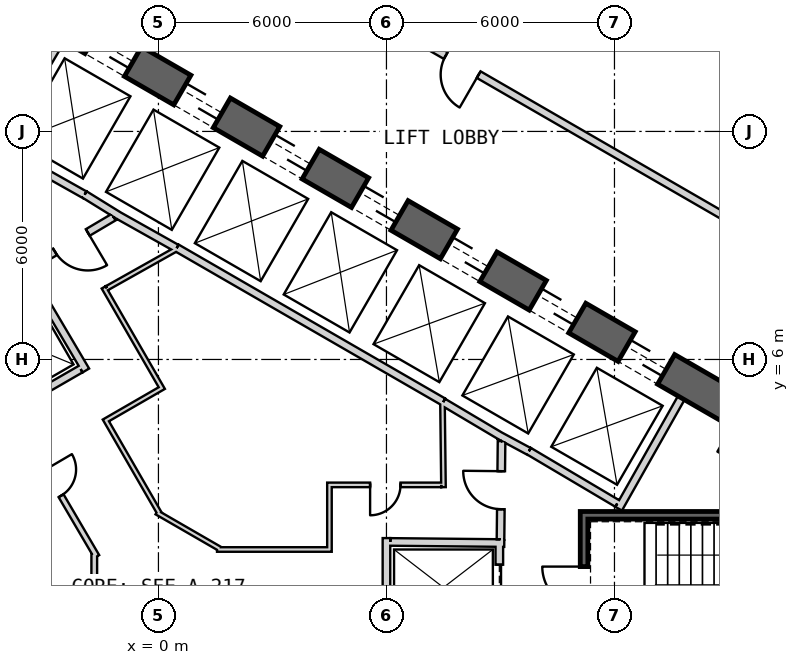
"""IFC4 building model, lengths in metres.
Left out: names, types, materials, properties, quantities, classifications, styles, units other than length and angle.
Written with IfcOpenShell. Run it as: python <this file> out.ifc"""

import sys

from ifc_helpers import new_model, si_unit, direction, frame, frame_2d, origin, place, context, subcontext, project, spatial, rectangle, extrude, element, fill, save


model = new_model("IFC4")
c1 = context("Model", 3, precision=1e-05, world=origin(), true_north=direction((0.0, 1.0)))
c2 = subcontext(c1, "Body", "Model", "MODEL_VIEW")
j1 = project(units=[si_unit("LENGTHUNIT", "METRE"), si_unit("PLANEANGLEUNIT", "RADIAN")], contexts=[c1])
p1 = place(None, origin())
s1 = spatial("IfcSite", under=j1, at=p1, CompositionType="ELEMENT")
p2 = place(p1, origin())
s2 = spatial("IfcBuilding", under=s1, at=p2, CompositionType="ELEMENT")
p3 = place(p2, frame((0.0, 0.0, 131.6)))
s3 = spatial("IfcBuildingStorey", under=s2, at=p3, CompositionType="ELEMENT", Elevation=131.6)
p4 = place(p3, frame((19.475, 2.208, 0.0), z_axis=(0.0, 0.0, 1.0), x_axis=(-0.866028369851, 0.499994862586, 0.0)))
e1 = element("IfcWall", 1, at=p4, inside=s3, PredefinedType="SHEAR", context=c2, shape_type="SweptSolid", body=[
    extrude(rectangle(XDim=31.523, YDim=0.9, at=frame_2d((15.762, 0.0))), origin(), (0.0, 0.0, 1.0), 4.1),
])
p5 = place(p4, frame((7.062, 0.0, 0.0)))
e2 = element("IfcOpeningElement", 2, at=p5, cuts=e1, PredefinedType="OPENING", context=c2, shape_type="SweptSolid", body=[
    extrude(rectangle(XDim=1.2, YDim=2.4, at=frame_2d((0.6, 1.2))), frame((0.0, 0.46, 0.0), z_axis=(0.0, -1.0, 0.0), x_axis=(1.0, 0.0, 0.0)), (0.0, 0.0, 1.0), 0.92),
])
p6 = place(p4, frame((9.762, 0.0, 0.0)))
e3 = element("IfcOpeningElement", 3, at=p6, cuts=e1, PredefinedType="OPENING", context=c2, shape_type="SweptSolid", body=[
    extrude(rectangle(XDim=1.2, YDim=2.4, at=frame_2d((0.6, 1.2))), frame((0.0, 0.46, 0.0), z_axis=(0.0, -1.0, 0.0), x_axis=(1.0, 0.0, 0.0)), (0.0, 0.0, 1.0), 0.92),
])
p7 = place(p4, frame((12.462, 0.0, 0.0)))
e4 = element("IfcOpeningElement", 4, at=p7, cuts=e1, PredefinedType="OPENING", context=c2, shape_type="SweptSolid", body=[
    extrude(rectangle(XDim=1.2, YDim=2.4, at=frame_2d((0.6, 1.2))), frame((0.0, 0.46, 0.0), z_axis=(0.0, -1.0, 0.0), x_axis=(1.0, 0.0, 0.0)), (0.0, 0.0, 1.0), 0.92),
])
p8 = place(p4, frame((15.162, 0.0, 0.0)))
e5 = element("IfcOpeningElement", 5, at=p8, cuts=e1, PredefinedType="OPENING", context=c2, shape_type="SweptSolid", body=[
    extrude(rectangle(XDim=1.2, YDim=2.4, at=frame_2d((0.6, 1.2))), frame((0.0, 0.46, 0.0), z_axis=(0.0, -1.0, 0.0), x_axis=(1.0, 0.0, 0.0)), (0.0, 0.0, 1.0), 0.92),
])
p9 = place(p4, frame((17.862, 0.0, 0.0)))
e6 = element("IfcOpeningElement", 6, at=p9, cuts=e1, PredefinedType="OPENING", context=c2, shape_type="SweptSolid", body=[
    extrude(rectangle(XDim=1.2, YDim=2.4, at=frame_2d((0.6, 1.2))), frame((0.0, 0.46, 0.0), z_axis=(0.0, -1.0, 0.0), x_axis=(1.0, 0.0, 0.0)), (0.0, 0.0, 1.0), 0.92),
])
p10 = place(p4, frame((20.562, 0.0, 0.0)))
e7 = element("IfcOpeningElement", 7, at=p10, cuts=e1, PredefinedType="OPENING", context=c2, shape_type="SweptSolid", body=[
    extrude(rectangle(XDim=1.2, YDim=2.4, at=frame_2d((0.6, 1.2))), frame((0.0, 0.46, 0.0), z_axis=(0.0, -1.0, 0.0), x_axis=(1.0, 0.0, 0.0)), (0.0, 0.0, 1.0), 0.92),
])
p11 = place(p4, frame((23.262, 0.0, 0.0)))
e8 = element("IfcOpeningElement", 8, at=p11, cuts=e1, PredefinedType="OPENING", context=c2, shape_type="SweptSolid", body=[
    extrude(rectangle(XDim=1.2, YDim=2.4, at=frame_2d((0.6, 1.2))), frame((0.0, 0.46, 0.0), z_axis=(0.0, -1.0, 0.0), x_axis=(1.0, 0.0, 0.0)), (0.0, 0.0, 1.0), 0.92),
])
p12 = place(p4, frame((3.612, 0.0, 0.0)))
e9 = element("IfcOpeningElement", 9, at=p12, cuts=e1, PredefinedType="OPENING", context=c2, shape_type="SweptSolid", body=[
    extrude(rectangle(XDim=1.2, YDim=2.4, at=frame_2d((0.6, 1.2))), frame((0.0, 0.46, 0.0), z_axis=(0.0, -1.0, 0.0), x_axis=(1.0, 0.0, 0.0)), (0.0, 0.0, 1.0), 0.92),
])
p13 = place(p4, frame((26.712, 0.0, 0.0)))
e10 = element("IfcOpeningElement", 10, at=p13, cuts=e1, PredefinedType="OPENING", context=c2, shape_type="SweptSolid", body=[
    extrude(rectangle(XDim=1.2, YDim=2.4, at=frame_2d((0.6, 1.2))), frame((0.0, 0.46, 0.0), z_axis=(0.0, -1.0, 0.0), x_axis=(1.0, 0.0, 0.0)), (0.0, 0.0, 1.0), 0.92),
])
p14 = place(p3, frame((7.497, 4.886, 0.0), z_axis=(0.0, 0.0, 1.0), x_axis=(-0.866030989016, 0.499990325971, 0.0)))
e11 = element("IfcWall", 11, at=p14, inside=s3, PredefinedType="PLUMBINGWALL", context=c2, shape_type="SweptSolid", body=[
    extrude(rectangle(XDim=8.1, YDim=0.2, at=frame_2d((4.05, 0.0))), origin(), (0.0, 0.0, 1.0), 3.8),
])
p15 = place(p3, frame((12.11, 2.073, 0.0), z_axis=(0.0, 0.0, 1.0), x_axis=(0.49196600604, 0.870614408852, 0.0)))
e12 = element("IfcWall", 12, at=p15, inside=s3, PredefinedType="PLUMBINGWALL", context=c2, shape_type="SweptSolid", body=[
    extrude(rectangle(XDim=3.35, YDim=0.2, at=frame_2d((1.675, 0.0))), origin(), (0.0, 0.0, 1.0), 3.8),
])
p16 = place(p3, frame((12.073, 2.211, 0.0), z_axis=(0.0, 0.0, 1.0), x_axis=(-0.860438357912, 0.509554542943, 0.0)))
e13 = element("IfcWall", 13, at=p16, inside=s3, PredefinedType="PLUMBINGWALL", context=c2, shape_type="SweptSolid", body=[
    extrude(rectangle(XDim=2.7, YDim=0.2, at=frame_2d((1.35, 0.0))), origin(), (0.0, 0.0, 1.0), 3.8),
])
p17 = place(p3, frame((9.748, 3.583, 0.0), z_axis=(0.0, 0.0, 1.0), x_axis=(-0.880917147855, 0.473270513147, 0.0)))
e14 = element("IfcWall", 14, at=p17, inside=s3, PredefinedType="PLUMBINGWALL", context=c2, shape_type="SweptSolid", body=[
    extrude(rectangle(XDim=0.878, YDim=0.2, at=frame_2d((0.439, 0.0))), origin(), (0.0, 0.0, 1.0), 3.8),
])
p18 = place(p3, frame((9.08, 3.937, 0.0), z_axis=(0.0, 0.0, 1.0), x_axis=(-0.859981807212, 0.510324691999, 0.0)))
e15 = element("IfcWall", 15, at=p18, inside=s3, PredefinedType="PLUMBINGWALL", context=c2, shape_type="SweptSolid", body=[
    extrude(rectangle(XDim=1.845, YDim=0.2, at=frame_2d((0.922, 0.0))), origin(), (0.0, 0.0, 1.0), 3.8),
])
p19 = place(p3, frame((-1.941, 10.339, 0.0), z_axis=(0.0, 0.0, 1.0), x_axis=(0.850216889117, -0.526432561171, 0.0)))
e16 = element("IfcWall", 16, at=p19, inside=s3, PredefinedType="PLUMBINGWALL", context=c2, shape_type="SweptSolid", body=[
    extrude(rectangle(XDim=1.078, YDim=0.2, at=frame_2d((0.539, 0.0))), origin(), (0.0, 0.0, 1.0), 3.8),
])
p20 = place(p3, frame((0.478, 8.928, 0.0), z_axis=(0.0, 0.0, 1.0), x_axis=(-0.871988740738, 0.489525929882, 0.0)))
e17 = element("IfcWall", 17, at=p20, inside=s3, PredefinedType="PLUMBINGWALL", context=c2, shape_type="SweptSolid", body=[
    extrude(rectangle(XDim=1.845, YDim=0.2, at=frame_2d((0.922, 0.0))), origin(), (0.0, 0.0, 1.0), 3.8),
])
p21 = place(p3, frame((-4.296, 11.659, 0.0), z_axis=(0.0, 0.0, 1.0), x_axis=(0.871534483978, -0.490334215854, 0.0)))
e18 = element("IfcWall", 18, at=p21, inside=s3, PredefinedType="PLUMBINGWALL", context=c2, shape_type="SweptSolid", body=[
    extrude(rectangle(XDim=2.7, YDim=0.2, at=frame_2d((1.35, 0.0))), origin(), (0.0, 0.0, 1.0), 3.8),
])
p22 = place(p3, frame((-4.158, 11.696, 0.0), z_axis=(0.0, 0.0, 1.0), x_axis=(0.508018930956, 0.861345903683, 0.0)))
e19 = element("IfcWall", 19, at=p22, inside=s3, PredefinedType="PLUMBINGWALL", context=c2, shape_type="SweptSolid", body=[
    extrude(rectangle(XDim=3.15, YDim=0.2, at=frame_2d((1.575, 0.0))), origin(), (0.0, 0.0, 1.0), 3.8),
])
p23 = place(p3, frame((19.2, 1.9, -0.3), z_axis=(0.0, 0.0, 1.0), x_axis=(-1.0, 0.0, 0.0)))
e20 = element("IfcWall", 20, at=p23, inside=s3, PredefinedType="SHEAR", context=c2, shape_type="SweptSolid", body=[
    extrude(rectangle(XDim=8.1, YDim=0.2, at=frame_2d((4.05, 0.0))), origin(), (0.0, 0.0, 1.0), 4.1),
])
p24 = place(p3, frame((11.2, -1.8, -0.3), z_axis=(0.0, 0.0, 1.0), x_axis=(0.0, 1.0, 0.0)))
e21 = element("IfcWall", 21, at=p24, inside=s3, PredefinedType="SHEAR", context=c2, shape_type="SweptSolid", body=[
    extrude(rectangle(XDim=3.6, YDim=0.2, at=frame_2d((1.8, 0.0))), origin(), (0.0, 0.0, 1.0), 4.1),
])
p25 = place(p24, frame((1.25, 0.0, 0.3)))
e22 = element("IfcOpeningElement", 22, at=p25, cuts=e21, PredefinedType="OPENING", context=c2, shape_type="SweptSolid", body=[
    extrude(rectangle(XDim=1.1, YDim=2.1, at=frame_2d((0.55, 1.05))), frame((0.0, 0.11, 0.0), z_axis=(0.0, -1.0, 0.0), x_axis=(1.0, 0.0, 0.0)), (0.0, 0.0, 1.0), 0.22),
])
p26 = place(p3, frame((8.97, 1.2, 0.0), z_axis=(0.0, 0.0, 1.0), x_axis=(0.0, -1.0, 0.0)))
e23 = element("IfcWall", 23, at=p26, inside=s3, PredefinedType="PLUMBINGWALL", context=c2, shape_type="SweptSolid", body=[
    extrude(rectangle(XDim=2.4, YDim=0.2, at=frame_2d((1.2, 0.0))), origin(), (0.0, 0.0, 1.0), 3.8),
])
p27 = place(p26, frame((0.6, 0.0, 0.0)))
e24 = element("IfcOpeningElement", 24, at=p27, cuts=e23, PredefinedType="OPENING", context=c2, shape_type="SweptSolid", body=[
    extrude(rectangle(XDim=1.2, YDim=2.4, at=frame_2d((0.6, 1.2))), frame((0.0, 0.11, 0.0), z_axis=(0.0, -1.0, 0.0), x_axis=(1.0, 0.0, 0.0)), (0.0, 0.0, 1.0), 0.22),
])
p28 = place(p3, frame((6.0, -1.09, 0.0), z_axis=(0.0, 0.0, 1.0), x_axis=(0.0, 1.0, 0.0)))
e25 = element("IfcWall", 25, at=p28, inside=s3, PredefinedType="PLUMBINGWALL", context=c2, shape_type="SweptSolid", body=[
    extrude(rectangle(XDim=2.39, YDim=0.2, at=frame_2d((1.195, 0.0))), origin(), (0.0, 0.0, 1.0), 3.8),
])
p29 = place(p3, frame((9.1, 1.169, 0.0), z_axis=(0.0, 0.0, 1.0), x_axis=(-0.99994990606, 0.010009264196, 0.0)))
e26 = element("IfcWall", 26, at=p29, inside=s3, PredefinedType="PLUMBINGWALL", context=c2, shape_type="SweptSolid", body=[
    extrude(rectangle(XDim=3.0, YDim=0.2, at=frame_2d((1.5, 0.0))), origin(), (0.0, 0.0, 1.0), 3.8),
])
p30 = place(p3, frame((-3.538, 8.465, 0.0), z_axis=(0.0, 0.0, 1.0), x_axis=(0.508616218331, -0.860993346345, 0.0)))
e27 = element("IfcWall", 27, at=p30, inside=s3, PredefinedType="PLUMBINGWALL", context=c2, shape_type="SweptSolid", body=[
    extrude(rectangle(XDim=3.2, YDim=0.2, at=frame_2d((1.6, 0.0))), origin(), (0.0, 0.0, 1.0), 3.8),
])
p31 = place(p3, frame((-2.047, 5.746, 0.0), z_axis=(0.0, 0.0, 1.0), x_axis=(-0.866019606374, -0.500010041276, 0.0)))
e28 = element("IfcWall", 28, at=p31, inside=s3, PredefinedType="PLUMBINGWALL", context=c2, shape_type="SweptSolid", body=[
    extrude(rectangle(XDim=2.205, YDim=0.2, at=frame_2d((1.102, 0.0))), origin(), (0.0, 0.0, 1.0), 3.8),
])
p32 = place(p3, frame((9.001, 1.27, 0.0), z_axis=(0.0, 0.0, 1.0), x_axis=(0.010783593937, 0.99994185536, 0.0)))
e29 = element("IfcWall", 29, at=p32, inside=s3, PredefinedType="PARTITIONING", context=c2, shape_type="SweptSolid", body=[
    extrude(rectangle(XDim=2.581, YDim=0.2, at=frame_2d((1.291, 0.0))), origin(), (0.0, 0.0, 1.0), 3.8),
])
p33 = place(p32, frame((0.791, 0.0, 0.0)))
e30 = element("IfcOpeningElement", 30, at=p33, cuts=e29, PredefinedType="OPENING", context=c2, shape_type="SweptSolid", body=[
    extrude(rectangle(XDim=1.0, YDim=2.1, at=frame_2d((0.5, 1.05))), frame((0.0, 0.11, 0.0), z_axis=(0.0, -1.0, 0.0), x_axis=(1.0, 0.0, 0.0)), (0.0, 0.0, 1.0), 0.22),
])
p34 = place(p3, frame((-1.179, 9.745, 0.0), z_axis=(0.0, 0.0, 1.0), x_axis=(-0.860598681535, -0.509283721849, 0.0)))
e31 = element("IfcWall", 31, at=p34, inside=s3, PredefinedType="PARTITIONING", context=c2, shape_type="SweptSolid", body=[
    extrude(rectangle(XDim=2.581, YDim=0.2, at=frame_2d((1.291, 0.0))), origin(), (0.0, 0.0, 1.0), 3.8),
])
p35 = place(p34, frame((0.791, 0.0, 0.0)))
e32 = element("IfcOpeningElement", 32, at=p35, cuts=e31, PredefinedType="OPENING", context=c2, shape_type="SweptSolid", body=[
    extrude(rectangle(XDim=1.0, YDim=2.1, at=frame_2d((0.5, 1.05))), frame((0.0, 0.11, 0.0), z_axis=(0.0, -1.0, 0.0), x_axis=(1.0, 0.0, 0.0)), (0.0, 0.0, 1.0), 0.22),
])
p36 = place(p3, frame((-1.624, 0.815, 0.0), z_axis=(0.0, 0.0, 1.0), x_axis=(-0.505868173579, 0.862610799237, 0.0)))
e33 = element("IfcWall", 33, at=p36, inside=s3, PredefinedType="PLUMBINGWALL", context=c2, shape_type="SweptSolid", body=[
    extrude(rectangle(XDim=4.383, YDim=0.15, at=frame_2d((2.191, 0.0))), origin(), (0.0, 0.0, 1.0), 3.8),
])
p37 = place(p36, frame((1.855, 0.0, 0.0)))
e34 = element("IfcOpeningElement", 34, at=p37, cuts=e33, PredefinedType="OPENING", context=c2, shape_type="SweptSolid", body=[
    extrude(rectangle(XDim=0.8, YDim=2.1, at=frame_2d((0.4, 1.05))), frame((0.0, 0.085, 0.0), z_axis=(0.0, -1.0, 0.0), x_axis=(1.0, 0.0, 0.0)), (0.0, 0.0, 1.0), 0.17),
])
p38 = place(p3, frame((-1.689, -1.053, 0.0), z_axis=(0.0, 0.0, 1.0), x_axis=(0.0, 1.0, 0.0)))
e35 = element("IfcWall", 35, at=p38, inside=s3, PredefinedType="PLUMBINGWALL", context=c2, shape_type="SweptSolid", body=[
    extrude(rectangle(XDim=1.954, YDim=0.15, at=frame_2d((0.977, 0.0))), origin(), (0.0, 0.0, 1.0), 3.8),
])
p39 = place(p3, frame((7.501, 2.64, 0.0), z_axis=(0.0, 0.0, 1.0), x_axis=(-0.01174194727, 0.999931060961, 0.0)))
e36 = element("IfcWall", 36, at=p39, inside=s3, PredefinedType="PARTITIONING", context=c2, shape_type="SweptSolid", body=[
    extrude(rectangle(XDim=2.225, YDim=0.12, at=frame_2d((1.112, 0.0))), origin(), (0.0, 0.0, 1.0), 3.8),
])
p40 = place(p3, frame((4.44, 2.7, 0.0), z_axis=(0.0, 0.0, 1.0), x_axis=(1.0, 0.0, 0.0)))
e37 = element("IfcWall", 37, at=p40, inside=s3, PredefinedType="PARTITIONING", context=c2, shape_type="SweptSolid", body=[
    extrude(rectangle(XDim=3.0, YDim=0.12, at=frame_2d((1.5, 0.0))), origin(), (0.0, 0.0, 1.0), 3.8),
])
p41 = place(p40, frame((1.13, 0.0, 0.0)))
e38 = element("IfcOpeningElement", 38, at=p41, cuts=e37, PredefinedType="OPENING", context=c2, shape_type="SweptSolid", body=[
    extrude(rectangle(XDim=0.8, YDim=2.1, at=frame_2d((0.4, 1.05))), frame((0.0, 0.07, 0.0), z_axis=(0.0, -1.0, 0.0), x_axis=(1.0, 0.0, 0.0)), (0.0, 0.0, 1.0), 0.14),
])
p42 = place(p3, frame((4.5, 0.94, 0.0), z_axis=(0.0, 0.0, 1.0), x_axis=(0.0, 1.0, 0.0)))
e39 = element("IfcWall", 39, at=p42, inside=s3, PredefinedType="PARTITIONING", context=c2, shape_type="SweptSolid", body=[
    extrude(rectangle(XDim=1.7, YDim=0.12, at=frame_2d((0.85, 0.0))), origin(), (0.0, 0.0, 1.0), 3.8),
])
p43 = place(p3, frame((1.542, 1.0, 0.0), z_axis=(0.0, 0.0, 1.0), x_axis=(1.0, 0.0, 0.0)))
e40 = element("IfcWall", 40, at=p43, inside=s3, PredefinedType="PARTITIONING", context=c2, shape_type="SweptSolid", body=[
    extrude(rectangle(XDim=2.898, YDim=0.12, at=frame_2d((1.449, 0.0))), origin(), (0.0, 0.0, 1.0), 3.8),
])
p44 = place(p3, frame((-0.047, 1.977, 0.0), z_axis=(0.0, 0.0, 1.0), x_axis=(0.865998615205, -0.500046396311, 0.0)))
e41 = element("IfcWall", 41, at=p44, inside=s3, PredefinedType="PARTITIONING", context=c2, shape_type="SweptSolid", body=[
    extrude(rectangle(XDim=1.935, YDim=0.12, at=frame_2d((0.968, 0.0))), origin(), (0.0, 0.0, 1.0), 3.8),
])
p45 = place(p3, frame((-1.414, 4.449, 0.0), z_axis=(0.0, 0.0, 1.0), x_axis=(0.500028961621, -0.866008682139, 0.0)))
e42 = element("IfcWall", 42, at=p45, inside=s3, PredefinedType="PARTITIONING", context=c2, shape_type="SweptSolid", body=[
    extrude(rectangle(XDim=2.896, YDim=0.12, at=frame_2d((1.448, 0.0))), origin(), (0.0, 0.0, 1.0), 3.8),
])
p46 = place(p3, frame((0.14, 5.277, 0.0), z_axis=(0.0, 0.0, 1.0), x_axis=(-0.865989465428, -0.500062241894, 0.0)))
e43 = element("IfcWall", 43, at=p46, inside=s3, PredefinedType="PARTITIONING", context=c2, shape_type="SweptSolid", body=[
    extrude(rectangle(XDim=1.7, YDim=0.12, at=frame_2d((0.85, 0.0))), origin(), (0.0, 0.0, 1.0), 3.8),
])
p47 = place(p3, frame((-1.442, 7.897, 0.0), z_axis=(0.0, 0.0, 1.0), x_axis=(0.499990139034, -0.866031096941, 0.0)))
e44 = element("IfcWall", 44, at=p47, inside=s3, PredefinedType="PARTITIONING", context=c2, shape_type="SweptSolid", body=[
    extrude(rectangle(XDim=3.0, YDim=0.12, at=frame_2d((1.5, 0.0))), origin(), (0.0, 0.0, 1.0), 3.8),
])
p48 = place(p3, frame((0.475, 8.905, 0.0), z_axis=(0.0, 0.0, 1.0), x_axis=(-0.871832572129, -0.489804007921, 0.0)))
e45 = element("IfcWall", 45, at=p48, inside=s3, PredefinedType="PARTITIONING", context=c2, shape_type="SweptSolid", body=[
    extrude(rectangle(XDim=2.104, YDim=0.12, at=frame_2d((1.052, 0.0))), origin(), (0.0, 0.0, 1.0), 3.8),
])
p49 = place(p3, frame((22.336, 5.464, 0.0), z_axis=(0.0, 0.0, 1.0), x_axis=(-0.866027503332, 0.499996363459, 0.0)))
e46 = element("IfcWall", 46, at=p49, inside=s3, PredefinedType="PARTITIONING", context=c2, shape_type="SweptSolid", body=[
    extrude(rectangle(XDim=33.022, YDim=0.2, at=frame_2d((16.511, 0.0))), origin(), (0.0, 0.0, 1.0), 2.98),
])
p50 = place(p49, frame((16.061, 0.0, 0.0)))
e47 = element("IfcOpeningElement", 47, at=p50, cuts=e46, PredefinedType="OPENING", context=c2, shape_type="SweptSolid", body=[
    extrude(rectangle(XDim=1.0, YDim=2.1, at=frame_2d((0.5, 1.05))), frame((0.0, 0.11, 0.0), z_axis=(0.0, -1.0, 0.0), x_axis=(1.0, 0.0, 0.0)), (0.0, 0.0, 1.0), 0.22),
])
p51 = place(p25, origin())
e48 = element("IfcDoor", 48, at=p51, inside=s3, OperationType="SINGLE_SWING_LEFT", PredefinedType="USERDEFINED", context=c2, shape_type="SweptSolid", body=[
    extrude(rectangle(XDim=1.1, YDim=2.1, at=frame_2d((0.55, 1.05))), frame((0.0, 0.025, 0.0), z_axis=(0.0, -1.0, 0.0), x_axis=(1.0, 0.0, 0.0)), (0.0, 0.0, 1.0), 0.05),
])
fill(e22, e48)
p52 = place(p33, origin())
e49 = element("IfcDoor", 49, at=p52, inside=s3, OperationType="SINGLE_SWING_LEFT", PredefinedType="USERDEFINED", context=c2, shape_type="SweptSolid", body=[
    extrude(rectangle(XDim=1.0, YDim=2.1, at=frame_2d((0.5, 1.05))), frame((0.0, 0.025, 0.0), z_axis=(0.0, -1.0, 0.0), x_axis=(1.0, 0.0, 0.0)), (0.0, 0.0, 1.0), 0.05),
])
fill(e30, e49)
p53 = place(p27, origin())
e50 = element("IfcDoor", 50, at=p53, inside=s3, OperationType="SLIDING_TO_LEFT", PredefinedType="USERDEFINED", context=c2, shape_type="SweptSolid", body=[
    extrude(rectangle(XDim=1.2, YDim=2.4, at=frame_2d((0.6, 1.2))), frame((0.0, 0.025, 0.0), z_axis=(0.0, -1.0, 0.0), x_axis=(1.0, 0.0, 0.0)), (0.0, 0.0, 1.0), 0.05),
])
fill(e24, e50)
p54 = place(p35, origin())
e51 = element("IfcDoor", 51, at=p54, inside=s3, OperationType="SINGLE_SWING_RIGHT", PredefinedType="USERDEFINED", context=c2, shape_type="SweptSolid", body=[
    extrude(rectangle(XDim=1.0, YDim=2.1, at=frame_2d((0.5, 1.05))), frame((0.0, 0.025, 0.0), z_axis=(0.0, -1.0, 0.0), x_axis=(1.0, 0.0, 0.0)), (0.0, 0.0, 1.0), 0.05),
])
fill(e32, e51)
p55 = place(p37, origin())
e52 = element("IfcDoor", 52, at=p55, inside=s3, OperationType="SINGLE_SWING_LEFT", PredefinedType="USERDEFINED", context=c2, shape_type="SweptSolid", body=[
    extrude(rectangle(XDim=0.8, YDim=2.1, at=frame_2d((0.4, 1.05))), frame((0.0, 0.025, 0.0), z_axis=(0.0, -1.0, 0.0), x_axis=(1.0, 0.0, 0.0)), (0.0, 0.0, 1.0), 0.05),
])
fill(e34, e52)
p56 = place(p41, origin())
e53 = element("IfcDoor", 53, at=p56, inside=s3, OperationType="SINGLE_SWING_RIGHT", PredefinedType="USERDEFINED", context=c2, shape_type="SweptSolid", body=[
    extrude(rectangle(XDim=0.8, YDim=2.1, at=frame_2d((0.4, 1.05))), frame((0.0, 0.025, 0.0), z_axis=(0.0, -1.0, 0.0), x_axis=(1.0, 0.0, 0.0)), (0.0, 0.0, 1.0), 0.05),
])
fill(e38, e53)
p57 = place(p50, origin())
e54 = element("IfcDoor", 54, at=p57, inside=s3, OperationType="SINGLE_SWING_RIGHT", PredefinedType="USERDEFINED", context=c2, shape_type="SweptSolid", body=[
    extrude(rectangle(XDim=1.0, YDim=2.1, at=frame_2d((0.5, 1.05))), frame((0.0, 0.025, 0.0), z_axis=(0.0, -1.0, 0.0), x_axis=(1.0, 0.0, 0.0)), (0.0, 0.0, 1.0), 0.05),
])
fill(e47, e54)
p58 = place(p5, origin())
e55 = element("IfcDoor", 55, at=p58, inside=s3, OperationType="SLIDING_TO_LEFT", PredefinedType="USERDEFINED", context=c2, shape_type="SweptSolid", body=[
    extrude(rectangle(XDim=1.2, YDim=2.4, at=frame_2d((0.6, 1.2))), frame((0.0, 0.025, 0.0), z_axis=(0.0, -1.0, 0.0), x_axis=(1.0, 0.0, 0.0)), (0.0, 0.0, 1.0), 0.05),
])
fill(e2, e55)
p59 = place(p6, origin())
e56 = element("IfcDoor", 56, at=p59, inside=s3, OperationType="SLIDING_TO_LEFT", PredefinedType="USERDEFINED", context=c2, shape_type="SweptSolid", body=[
    extrude(rectangle(XDim=1.2, YDim=2.4, at=frame_2d((0.6, 1.2))), frame((0.0, 0.025, 0.0), z_axis=(0.0, -1.0, 0.0), x_axis=(1.0, 0.0, 0.0)), (0.0, 0.0, 1.0), 0.05),
])
fill(e3, e56)
p60 = place(p7, origin())
e57 = element("IfcDoor", 57, at=p60, inside=s3, OperationType="SLIDING_TO_LEFT", PredefinedType="USERDEFINED", context=c2, shape_type="SweptSolid", body=[
    extrude(rectangle(XDim=1.2, YDim=2.4, at=frame_2d((0.6, 1.2))), frame((0.0, 0.025, 0.0), z_axis=(0.0, -1.0, 0.0), x_axis=(1.0, 0.0, 0.0)), (0.0, 0.0, 1.0), 0.05),
])
fill(e4, e57)
p61 = place(p8, origin())
e58 = element("IfcDoor", 58, at=p61, inside=s3, OperationType="SLIDING_TO_LEFT", PredefinedType="USERDEFINED", context=c2, shape_type="SweptSolid", body=[
    extrude(rectangle(XDim=1.2, YDim=2.4, at=frame_2d((0.6, 1.2))), frame((0.0, 0.025, 0.0), z_axis=(0.0, -1.0, 0.0), x_axis=(1.0, 0.0, 0.0)), (0.0, 0.0, 1.0), 0.05),
])
fill(e5, e58)
p62 = place(p9, origin())
e59 = element("IfcDoor", 59, at=p62, inside=s3, OperationType="SLIDING_TO_LEFT", PredefinedType="USERDEFINED", context=c2, shape_type="SweptSolid", body=[
    extrude(rectangle(XDim=1.2, YDim=2.4, at=frame_2d((0.6, 1.2))), frame((0.0, 0.025, 0.0), z_axis=(0.0, -1.0, 0.0), x_axis=(1.0, 0.0, 0.0)), (0.0, 0.0, 1.0), 0.05),
])
fill(e6, e59)
p63 = place(p10, origin())
e60 = element("IfcDoor", 60, at=p63, inside=s3, OperationType="SLIDING_TO_LEFT", PredefinedType="USERDEFINED", context=c2, shape_type="SweptSolid", body=[
    extrude(rectangle(XDim=1.2, YDim=2.4, at=frame_2d((0.6, 1.2))), frame((0.0, 0.025, 0.0), z_axis=(0.0, -1.0, 0.0), x_axis=(1.0, 0.0, 0.0)), (0.0, 0.0, 1.0), 0.05),
])
fill(e7, e60)
p64 = place(p11, origin())
e61 = element("IfcDoor", 61, at=p64, inside=s3, OperationType="SLIDING_TO_LEFT", PredefinedType="USERDEFINED", context=c2, shape_type="SweptSolid", body=[
    extrude(rectangle(XDim=1.2, YDim=2.4, at=frame_2d((0.6, 1.2))), frame((0.0, 0.025, 0.0), z_axis=(0.0, -1.0, 0.0), x_axis=(1.0, 0.0, 0.0)), (0.0, 0.0, 1.0), 0.05),
])
fill(e8, e61)
save(model, sys.argv[1])
